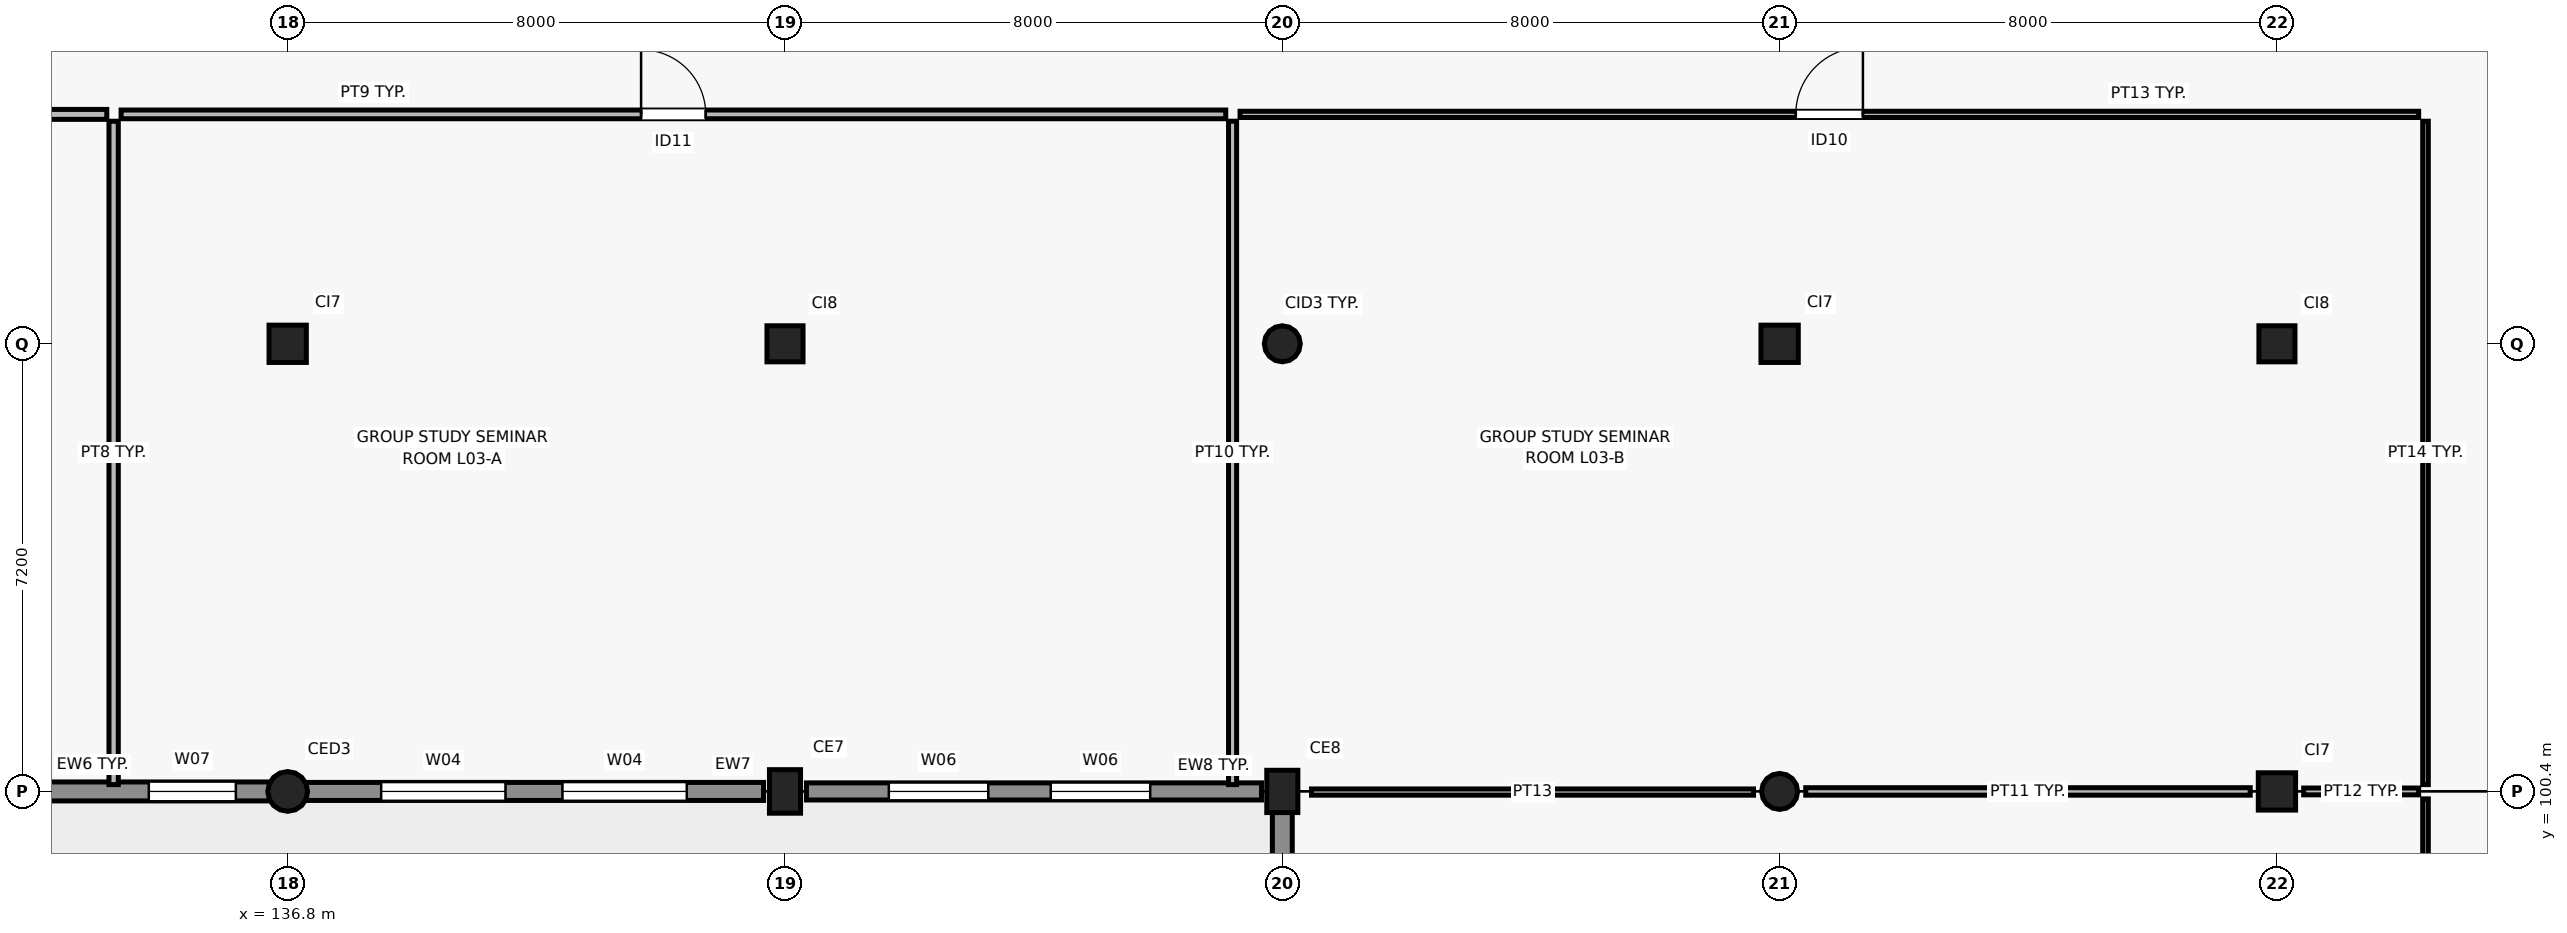
"""IFC4 building model, lengths in metres.
Left out: names, types, materials, properties, quantities, classifications, styles, units other than length and angle.
Written with IfcOpenShell. Run it as: python <this file> out.ifc"""

import sys

from ifc_helpers import new_model, si_unit, direction, frame, frame_2d, origin, origin_2d, place, context, subcontext, project, spatial, rectangle, circle, extrude, element, fill, save


model = new_model("IFC4")
c1 = context("Model", 3, precision=1e-05, world=origin(), true_north=direction((0.0, 1.0)))
c2 = subcontext(c1, "Body", "Model", "MODEL_VIEW")
j1 = project(units=[si_unit("LENGTHUNIT", "METRE"), si_unit("PLANEANGLEUNIT", "RADIAN")], contexts=[c1])
p1 = place(None, origin())
s1 = spatial("IfcSite", under=j1, at=p1, CompositionType="ELEMENT")
p2 = place(p1, origin())
s2 = spatial("IfcBuilding", under=s1, at=p2, CompositionType="ELEMENT")
p3 = place(p2, frame((0.0, 0.0, 13.2)))
s3 = spatial("IfcBuildingStorey", under=s2, at=p3, CompositionType="ELEMENT", Elevation=13.2)
p4 = place(p3, frame((136.8, 100.4, 0.0), z_axis=(0.0, 0.0, 1.0), x_axis=(1.0, 0.0, 0.0)))
e1 = element("IfcColumn", 1, at=p4, inside=s3, PredefinedType="COLUMN", context=c2, shape_type="SweptSolid", body=[
    extrude(circle(Radius=0.32, at=origin_2d()), origin(), (0.0, 0.0, 1.0), 4.2),
])
p5 = place(p3, frame((136.8, 107.6, 0.0), z_axis=(0.0, 0.0, 1.0), x_axis=(1.0, 0.0, 0.0)))
e2 = element("IfcColumn", 2, at=p5, inside=s3, PredefinedType="COLUMN", context=c2, shape_type="SweptSolid", body=[
    extrude(rectangle(XDim=0.6, YDim=0.6, at=origin_2d()), origin(), (0.0, 0.0, 1.0), 4.2),
])
p6 = place(p3, frame((144.8, 100.4, 0.0), z_axis=(0.0, 0.0, 1.0), x_axis=(1.0, 0.0, 0.0)))
e3 = element("IfcColumn", 3, at=p6, inside=s3, PredefinedType="COLUMN", context=c2, shape_type="SweptSolid", body=[
    extrude(rectangle(XDim=0.7, YDim=0.5, at=origin_2d()), origin(), (0.0, 0.0, 1.0), 4.2),
])
p7 = place(p3, frame((144.8, 107.6, 0.0), z_axis=(0.0, 0.0, 1.0), x_axis=(1.0, 0.0, 0.0)))
e4 = element("IfcColumn", 4, at=p7, inside=s3, PredefinedType="COLUMN", context=c2, shape_type="SweptSolid", body=[
    extrude(rectangle(XDim=0.58, YDim=0.58, at=origin_2d()), origin(), (0.0, 0.0, 1.0), 4.2),
])
p8 = place(p3, frame((152.8, 100.4, 0.0), z_axis=(0.0, 0.0, 1.0), x_axis=(1.0, 0.0, 0.0)))
e5 = element("IfcColumn", 5, at=p8, inside=s3, PredefinedType="COLUMN", context=c2, shape_type="SweptSolid", body=[
    extrude(rectangle(XDim=0.68, YDim=0.5, at=origin_2d()), origin(), (0.0, 0.0, 1.0), 4.2),
])
for number, where, z_axis, x_axis in (
    (6, (152.8, 107.6, 0.0), (0.0, 0.0, 1.0), (1.0, 0.0, 0.0)),
    (7, (160.8, 100.4, 0.0), (0.0, 0.0, 1.0), (1.0, 0.0, 0.0)),
):
    element("IfcColumn", number, at=place(p3, frame(where, z_axis=z_axis, x_axis=x_axis)), inside=s3, PredefinedType="COLUMN", context=c2, shape_type="SweptSolid", body=[
        extrude(circle(Radius=0.29, at=origin_2d()), origin(), (0.0, 0.0, 1.0), 4.2),
    ])
for number, where, z_axis, x_axis in (
    (8, (160.8, 107.6, 0.0), (0.0, 0.0, 1.0), (1.0, 0.0, 0.0)),
    (9, (168.8, 100.4, 0.0), (0.0, 0.0, 1.0), (1.0, 0.0, 0.0)),
):
    element("IfcColumn", number, at=place(p3, frame(where, z_axis=z_axis, x_axis=x_axis)), inside=s3, PredefinedType="COLUMN", context=c2, shape_type="SweptSolid", body=[
        extrude(rectangle(XDim=0.6, YDim=0.6, at=origin_2d()), origin(), (0.0, 0.0, 1.0), 4.2),
    ])
p9 = place(p3, frame((168.8, 107.6, 0.0), z_axis=(0.0, 0.0, 1.0), x_axis=(1.0, 0.0, 0.0)))
e10 = element("IfcColumn", 10, at=p9, inside=s3, PredefinedType="COLUMN", context=c2, shape_type="SweptSolid", body=[
    extrude(rectangle(XDim=0.58, YDim=0.58, at=origin_2d()), origin(), (0.0, 0.0, 1.0), 4.2),
])
p10 = place(p3, frame((152.8, 100.155, 0.0), z_axis=(0.0, 0.0, 1.0), x_axis=(0.0, -1.0, 0.0)))
e11 = element("IfcWall", 11, at=p10, inside=s3, PredefinedType="SOLIDWALL", context=c2, shape_type="SweptSolid", body=[
    extrude(rectangle(XDim=6.71, YDim=0.32, at=frame_2d((3.355, 0.0))), origin(), (0.0, 0.0, 1.0), 3.38),
])
p11 = place(p10, frame((1.71, 0.0, 0.9)))
e12 = element("IfcOpeningElement", 12, at=p11, cuts=e11, PredefinedType="OPENING", context=c2, shape_type="SweptSolid", body=[
    extrude(rectangle(XDim=0.95, YDim=1.25, at=frame_2d((0.475, 0.625))), frame((0.0, 0.17, 0.0), z_axis=(0.0, -1.0, 0.0), x_axis=(1.0, 0.0, 0.0)), (0.0, 0.0, 1.0), 0.34),
])
p12 = place(p10, frame((4.05, 0.0, 0.9)))
e13 = element("IfcOpeningElement", 13, at=p12, cuts=e11, PredefinedType="OPENING", context=c2, shape_type="SweptSolid", body=[
    extrude(rectangle(XDim=0.95, YDim=1.25, at=frame_2d((0.475, 0.625))), frame((0.0, 0.17, 0.0), z_axis=(0.0, -1.0, 0.0), x_axis=(1.0, 0.0, 0.0)), (0.0, 0.0, 1.0), 0.34),
])
p13 = place(p3, frame((129.135, 100.4, 0.0), z_axis=(0.0, 0.0, 1.0), x_axis=(1.0, 0.0, 0.0)))
e14 = element("IfcWall", 14, at=p13, inside=s3, PredefinedType="SOLIDWALL", context=c2, shape_type="SweptSolid", body=[
    extrude(rectangle(XDim=7.396, YDim=0.305, at=frame_2d((3.698, 0.0))), origin(), (0.0, 0.0, 1.0), 3.46),
])
p14 = place(p13, frame((1.232, 0.0, 0.9)))
e15 = element("IfcOpeningElement", 15, at=p14, cuts=e14, PredefinedType="OPENING", context=c2, shape_type="SweptSolid", body=[
    extrude(rectangle(XDim=2.4, YDim=1.8, at=frame_2d((1.2, 0.9))), frame((0.0, 0.162, 0.0), z_axis=(0.0, -1.0, 0.0), x_axis=(1.0, 0.0, 0.0)), (0.0, 0.0, 1.0), 0.325),
])
p15 = place(p13, frame((5.431, 0.0, 0.9)))
e16 = element("IfcOpeningElement", 16, at=p15, cuts=e14, PredefinedType="OPENING", context=c2, shape_type="SweptSolid", body=[
    extrude(rectangle(XDim=1.4, YDim=1.8, at=frame_2d((0.7, 0.9))), frame((0.0, 0.162, 0.0), z_axis=(0.0, -1.0, 0.0), x_axis=(1.0, 0.0, 0.0)), (0.0, 0.0, 1.0), 0.325),
])
p16 = place(p3, frame((137.069, 100.4, 0.0), z_axis=(0.0, 0.0, 1.0), x_axis=(1.0, 0.0, 0.0)))
e17 = element("IfcWall", 17, at=p16, inside=s3, PredefinedType="SOLIDWALL", context=c2, shape_type="SweptSolid", body=[
    extrude(rectangle(XDim=7.386, YDim=0.29, at=frame_2d((3.693, 0.0))), origin(), (0.0, 0.0, 1.0), 3.36),
])
p17 = place(p16, frame((1.235, 0.0, 0.9)))
e18 = element("IfcOpeningElement", 18, at=p17, cuts=e17, PredefinedType="OPENING", context=c2, shape_type="SweptSolid", body=[
    extrude(rectangle(XDim=2.0, YDim=1.8, at=frame_2d((1.0, 0.9))), frame((0.0, 0.155, 0.0), z_axis=(0.0, -1.0, 0.0), x_axis=(1.0, 0.0, 0.0)), (0.0, 0.0, 1.0), 0.31),
])
p18 = place(p16, frame((4.151, 0.0, 0.9)))
e19 = element("IfcOpeningElement", 19, at=p18, cuts=e17, PredefinedType="OPENING", context=c2, shape_type="SweptSolid", body=[
    extrude(rectangle(XDim=2.0, YDim=1.8, at=frame_2d((1.0, 0.9))), frame((0.0, 0.155, 0.0), z_axis=(0.0, -1.0, 0.0), x_axis=(1.0, 0.0, 0.0)), (0.0, 0.0, 1.0), 0.31),
])
p19 = place(p3, frame((145.145, 100.4, 0.0), z_axis=(0.0, 0.0, 1.0), x_axis=(1.0, 0.0, 0.0)))
e20 = element("IfcWall", 20, at=p19, inside=s3, PredefinedType="SOLIDWALL", context=c2, shape_type="SweptSolid", body=[
    extrude(rectangle(XDim=7.32, YDim=0.275, at=frame_2d((3.66, 0.0))), origin(), (0.0, 0.0, 1.0), 3.31),
])
p20 = place(p19, frame((1.325, 0.0, 0.9)))
e21 = element("IfcOpeningElement", 21, at=p20, cuts=e20, PredefinedType="OPENING", context=c2, shape_type="SweptSolid", body=[
    extrude(rectangle(XDim=1.6, YDim=1.8, at=frame_2d((0.8, 0.9))), frame((0.0, 0.147, 0.0), z_axis=(0.0, -1.0, 0.0), x_axis=(1.0, 0.0, 0.0)), (0.0, 0.0, 1.0), 0.295),
])
p21 = place(p19, frame((3.93, 0.0, 0.9)))
e22 = element("IfcOpeningElement", 22, at=p21, cuts=e20, PredefinedType="OPENING", context=c2, shape_type="SweptSolid", body=[
    extrude(rectangle(XDim=1.6, YDim=1.8, at=frame_2d((0.8, 0.9))), frame((0.0, 0.147, 0.0), z_axis=(0.0, -1.0, 0.0), x_axis=(1.0, 0.0, 0.0)), (0.0, 0.0, 1.0), 0.295),
])
p22 = place(p3, frame((120.8, 111.29, 0.0), z_axis=(0.0, 0.0, 1.0), x_axis=(1.0, 0.0, 0.0)))
e23 = element("IfcWall", 23, at=p22, inside=s3, PredefinedType="PARTITIONING", context=c2, shape_type="SweptSolid", body=[
    extrude(rectangle(XDim=13.09, YDim=0.16, at=frame_2d((6.545, 0.0))), origin(), (0.0, 0.0, 1.0), 3.5),
])
p23 = place(p3, frame((134.0, 100.51, 0.0), z_axis=(0.0, 0.0, 1.0), x_axis=(0.0, 1.0, 0.0)))
e24 = element("IfcWall", 24, at=p23, inside=s3, PredefinedType="PARTITIONING", context=c2, shape_type="SweptSolid", body=[
    extrude(rectangle(XDim=10.67, YDim=0.15, at=frame_2d((5.335, 0.0))), origin(), (0.0, 0.0, 1.0), 3.9),
])
p24 = place(p3, frame((134.12, 111.29, 0.0), z_axis=(0.0, 0.0, 1.0), x_axis=(1.0, 0.0, 0.0)))
e25 = element("IfcWall", 25, at=p24, inside=s3, PredefinedType="PARTITIONING", context=c2, shape_type="SweptSolid", body=[
    extrude(rectangle(XDim=17.77, YDim=0.14, at=frame_2d((8.885, 0.0))), origin(), (0.0, 0.0, 1.0), 3.5),
])
p25 = place(p24, frame((8.365, 0.0, 0.0)))
e26 = element("IfcOpeningElement", 26, at=p25, cuts=e25, PredefinedType="OPENING", context=c2, shape_type="SweptSolid", body=[
    extrude(rectangle(XDim=1.04, YDim=2.15, at=frame_2d((0.52, 1.075))), frame((0.0, 0.08, 0.0), z_axis=(0.0, -1.0, 0.0), x_axis=(1.0, 0.0, 0.0)), (0.0, 0.0, 1.0), 0.16),
])
p26 = place(p3, frame((152.0, 100.51, 0.0), z_axis=(0.0, 0.0, 1.0), x_axis=(0.0, 1.0, 0.0)))
e27 = element("IfcWall", 27, at=p26, inside=s3, PredefinedType="PARTITIONING", context=c2, shape_type="SweptSolid", body=[
    extrude(rectangle(XDim=10.67, YDim=0.13, at=frame_2d((5.335, 0.0))), origin(), (0.0, 0.0, 1.0), 3.9),
])
p27 = place(p3, frame((161.22, 100.4, 0.0), z_axis=(0.0, 0.0, 1.0), x_axis=(1.0, 0.0, 0.0)))
e28 = element("IfcWall", 28, at=p27, inside=s3, PredefinedType="PARTITIONING", context=c2, shape_type="SweptSolid", body=[
    extrude(rectangle(XDim=7.15, YDim=0.12, at=frame_2d((3.575, 0.0))), origin(), (0.0, 0.0, 1.0), 3.24),
])
p28 = place(p3, frame((169.23, 100.4, 0.0), z_axis=(0.0, 0.0, 1.0), x_axis=(1.0, 0.0, 0.0)))
e29 = element("IfcWall", 29, at=p28, inside=s3, PredefinedType="PARTITIONING", context=c2, shape_type="SweptSolid", body=[
    extrude(rectangle(XDim=1.85, YDim=0.11, at=frame_2d((0.925, 0.0))), origin(), (0.0, 0.0, 1.0), 3.3),
])
p29 = place(p3, frame((152.12, 111.29, 0.0), z_axis=(0.0, 0.0, 1.0), x_axis=(1.0, 0.0, 0.0)))
e30 = element("IfcWall", 30, at=p29, inside=s3, PredefinedType="PARTITIONING", context=c2, shape_type="SweptSolid", body=[
    extrude(rectangle(XDim=18.96, YDim=0.1, at=frame_2d((9.48, 0.0))), origin(), (0.0, 0.0, 1.0), 3.5),
])
p30 = place(p29, frame((8.94, 0.0, 0.0)))
e31 = element("IfcOpeningElement", 31, at=p30, cuts=e30, PredefinedType="OPENING", context=c2, shape_type="SweptSolid", body=[
    extrude(rectangle(XDim=1.08, YDim=2.15, at=frame_2d((0.54, 1.075))), frame((0.0, 0.06, 0.0), z_axis=(0.0, -1.0, 0.0), x_axis=(1.0, 0.0, 0.0)), (0.0, 0.0, 1.0), 0.12),
])
p31 = place(p3, frame((171.19, 100.51, 0.0), z_axis=(0.0, 0.0, 1.0), x_axis=(0.0, 1.0, 0.0)))
e32 = element("IfcWall", 32, at=p31, inside=s3, PredefinedType="PARTITIONING", context=c2, shape_type="SweptSolid", body=[
    extrude(rectangle(XDim=10.67, YDim=0.09, at=frame_2d((5.335, 0.0))), origin(), (0.0, 0.0, 1.0), 3.9),
])
p32 = place(p3, frame((153.27, 100.39, 0.0), z_axis=(0.0, 0.0, 1.0), x_axis=(1.0, 0.0, 0.0)))
e33 = element("IfcWall", 33, at=p32, inside=s3, PredefinedType="PARTITIONING", context=c2, shape_type="SweptSolid", body=[
    extrude(rectangle(XDim=7.11, YDim=0.1, at=frame_2d((3.555, 0.0))), origin(), (0.0, 0.0, 1.0), 3.21),
])
p33 = place(p3, frame((171.19, 68.12, 0.0), z_axis=(0.0, 0.0, 1.0), x_axis=(0.0, 1.0, 0.0)))
e34 = element("IfcWall", 34, at=p33, inside=s3, PredefinedType="PARTITIONING", context=c2, shape_type="SweptSolid", body=[
    extrude(rectangle(XDim=32.16, YDim=0.09, at=frame_2d((16.08, 0.0))), origin(), (0.0, 0.0, 1.0), 3.9),
])
p34 = place(p33, frame((15.52, 0.0, 0.0)))
e35 = element("IfcOpeningElement", 35, at=p34, cuts=e34, PredefinedType="OPENING", context=c2, shape_type="SweptSolid", body=[
    extrude(rectangle(XDim=1.12, YDim=2.2, at=frame_2d((0.56, 1.1))), frame((0.0, 0.055, 0.0), z_axis=(0.0, -1.0, 0.0), x_axis=(1.0, 0.0, 0.0)), (0.0, 0.0, 1.0), 0.11),
])
p35 = place(p15, origin())
e36 = element("IfcWindow", 36, at=p35, inside=s3, PartitioningType="SINGLE_PANEL", PredefinedType="WINDOW", context=c2, shape_type="SweptSolid", body=[
    extrude(rectangle(XDim=1.4, YDim=1.8, at=frame_2d((0.7, 0.9))), frame((0.0, 0.03, 0.0), z_axis=(0.0, -1.0, 0.0), x_axis=(1.0, 0.0, 0.0)), (0.0, 0.0, 1.0), 0.06),
])
fill(e16, e36)
p36 = place(p17, origin())
e37 = element("IfcWindow", 37, at=p36, inside=s3, PartitioningType="SINGLE_PANEL", PredefinedType="WINDOW", context=c2, shape_type="SweptSolid", body=[
    extrude(rectangle(XDim=2.0, YDim=1.8, at=frame_2d((1.0, 0.9))), frame((0.0, 0.03, 0.0), z_axis=(0.0, -1.0, 0.0), x_axis=(1.0, 0.0, 0.0)), (0.0, 0.0, 1.0), 0.06),
])
fill(e18, e37)
p37 = place(p18, origin())
e38 = element("IfcWindow", 38, at=p37, inside=s3, PartitioningType="SINGLE_PANEL", PredefinedType="WINDOW", context=c2, shape_type="SweptSolid", body=[
    extrude(rectangle(XDim=2.0, YDim=1.8, at=frame_2d((1.0, 0.9))), frame((0.0, 0.03, 0.0), z_axis=(0.0, -1.0, 0.0), x_axis=(1.0, 0.0, 0.0)), (0.0, 0.0, 1.0), 0.06),
])
fill(e19, e38)
p38 = place(p20, origin())
e39 = element("IfcWindow", 39, at=p38, inside=s3, PartitioningType="SINGLE_PANEL", PredefinedType="WINDOW", context=c2, shape_type="SweptSolid", body=[
    extrude(rectangle(XDim=1.6, YDim=1.8, at=frame_2d((0.8, 0.9))), frame((0.0, 0.03, 0.0), z_axis=(0.0, -1.0, 0.0), x_axis=(1.0, 0.0, 0.0)), (0.0, 0.0, 1.0), 0.06),
])
fill(e21, e39)
p39 = place(p21, origin())
e40 = element("IfcWindow", 40, at=p39, inside=s3, PartitioningType="SINGLE_PANEL", PredefinedType="WINDOW", context=c2, shape_type="SweptSolid", body=[
    extrude(rectangle(XDim=1.6, YDim=1.8, at=frame_2d((0.8, 0.9))), frame((0.0, 0.03, 0.0), z_axis=(0.0, -1.0, 0.0), x_axis=(1.0, 0.0, 0.0)), (0.0, 0.0, 1.0), 0.06),
])
fill(e22, e40)
p40 = place(p25, origin())
e41 = element("IfcDoor", 41, at=p40, inside=s3, OperationType="SINGLE_SWING_LEFT", PredefinedType="DOOR", context=c2, shape_type="SweptSolid", body=[
    extrude(rectangle(XDim=1.04, YDim=2.15, at=frame_2d((0.52, 1.075))), frame((0.0, 0.025, 0.0), z_axis=(0.0, -1.0, 0.0), x_axis=(1.0, 0.0, 0.0)), (0.0, 0.0, 1.0), 0.05),
])
fill(e26, e41)
p41 = place(p30, origin())
e42 = element("IfcDoor", 42, at=p41, inside=s3, OperationType="SINGLE_SWING_RIGHT", PredefinedType="DOOR", context=c2, shape_type="SweptSolid", body=[
    extrude(rectangle(XDim=1.08, YDim=2.15, at=frame_2d((0.54, 1.075))), frame((0.0, 0.025, 0.0), z_axis=(0.0, -1.0, 0.0), x_axis=(1.0, 0.0, 0.0)), (0.0, 0.0, 1.0), 0.05),
])
fill(e31, e42)
save(model, sys.argv[1])
